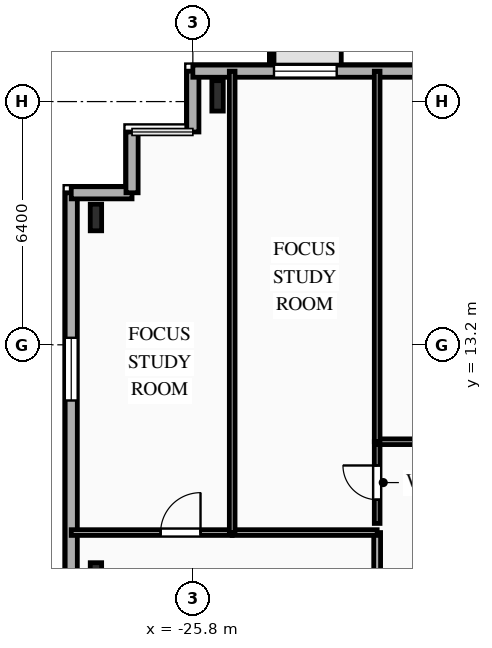
"""IFC4 building model, lengths in metres.
Left out: names, types, materials, properties, quantities, classifications, styles, units other than length and angle.
Written with IfcOpenShell. Run it as: python <this file> out.ifc"""

import sys

from ifc_helpers import new_model, si_unit, direction, frame, frame_2d, origin, origin_2d, place, context, subcontext, project, spatial, rectangle, i_section, extrude, element, fill, save


model = new_model("IFC4")
c1 = context("Model", 3, precision=1e-05, world=origin(), true_north=direction((0.0, 1.0)))
c2 = subcontext(c1, "Body", "Model", "MODEL_VIEW")
j1 = project(units=[si_unit("LENGTHUNIT", "METRE"), si_unit("PLANEANGLEUNIT", "RADIAN")], contexts=[c1])
p1 = place(None, origin())
s1 = spatial("IfcSite", under=j1, at=p1, CompositionType="ELEMENT")
p2 = place(p1, origin())
s2 = spatial("IfcBuilding", under=s1, at=p2, CompositionType="ELEMENT")
p3 = place(p2, frame((0.0, 0.0, 144.4)))
s3 = spatial("IfcBuildingStorey", under=s2, at=p3, CompositionType="ELEMENT", Elevation=144.4)
p4 = place(p3, frame((-25.15, 19.75, 0.0), z_axis=(0.0, 0.0, 1.0), x_axis=(1.0, 0.0, 0.0)))
e1 = element("IfcColumn", 1, at=p4, inside=s3, PredefinedType="COLUMN", context=c2, shape_type="SweptSolid", body=[
    extrude(i_section(OverallWidth=0.3, OverallDepth=0.8, WebThickness=0.018, FlangeThickness=0.033, FilletRadius=0.03, at=origin_2d()), origin(), (0.0, 0.0, 1.0), 3.35),
])
for number, where, z_axis, x_axis in (
    (2, (-28.35, 16.55, 0.0), (0.0, 0.0, 1.0), (1.0, 0.0, 0.0)),
    (3, (-28.35, 7.117, 0.0), (0.0, 0.0, 1.0), (1.0, 0.0, 0.0)),
):
    element("IfcColumn", number, at=place(p3, frame(where, z_axis=z_axis, x_axis=x_axis)), inside=s3, PredefinedType="COLUMN", context=c2, shape_type="SweptSolid", body=[
        extrude(i_section(OverallWidth=0.3, OverallDepth=0.7, WebThickness=0.017, FlangeThickness=0.032, FilletRadius=0.027, at=origin_2d()), origin(), (0.0, 0.0, 1.0), 3.35),
    ])
p5 = place(p3, frame((-29.0, -12.4, 0.0), z_axis=(0.0, 0.0, 1.0), x_axis=(0.0, 1.0, 0.0)))
e4 = element("IfcWall", 4, at=p5, inside=s3, PredefinedType="SOLIDWALL", context=c2, shape_type="SweptSolid", body=[
    extrude(rectangle(XDim=29.6, YDim=0.32, at=frame_2d((14.8, 0.0))), origin(), (0.0, 0.0, 1.0), 3.04),
])
p6 = place(p5, frame((3.895, 0.0, 0.85)))
e5 = element("IfcOpeningElement", 5, at=p6, cuts=e4, PredefinedType="OPENING", context=c2, shape_type="SweptSolid", body=[
    extrude(rectangle(XDim=1.65, YDim=1.85, at=frame_2d((0.825, 0.925))), frame((0.0, 0.17, 0.0), z_axis=(0.0, -1.0, 0.0), x_axis=(1.0, 0.0, 0.0)), (0.0, 0.0, 1.0), 0.34),
])
p7 = place(p5, frame((13.74, 0.0, 0.85)))
e6 = element("IfcOpeningElement", 6, at=p7, cuts=e4, PredefinedType="OPENING", context=c2, shape_type="SweptSolid", body=[
    extrude(rectangle(XDim=2.2, YDim=1.85, at=frame_2d((1.1, 0.925))), frame((0.0, 0.17, 0.0), z_axis=(0.0, -1.0, 0.0), x_axis=(1.0, 0.0, 0.0)), (0.0, 0.0, 1.0), 0.34),
])
p8 = place(p5, frame((24.135, 0.0, 0.85)))
e7 = element("IfcOpeningElement", 7, at=p8, cuts=e4, PredefinedType="OPENING", context=c2, shape_type="SweptSolid", body=[
    extrude(rectangle(XDim=1.65, YDim=1.85, at=frame_2d((0.825, 0.925))), frame((0.0, 0.17, 0.0), z_axis=(0.0, -1.0, 0.0), x_axis=(1.0, 0.0, 0.0)), (0.0, 0.0, 1.0), 0.34),
])
for number, where, z_axis, x_axis in (
    (8, (-29.0, 17.2, 0.0), (0.0, 0.0, 1.0), (1.0, 0.0, 0.0)),
    (9, (-27.4, 17.2, 0.0), (0.0, 0.0, 1.0), (0.0, 1.0, 0.0)),
):
    element("IfcWall", number, at=place(p3, frame(where, z_axis=z_axis, x_axis=x_axis)), inside=s3, PredefinedType="SOLIDWALL", context=c2, shape_type="SweptSolid", body=[
        extrude(rectangle(XDim=1.6, YDim=0.32, at=frame_2d((0.8, 0.0))), origin(), (0.0, 0.0, 1.0), 3.04),
    ])
p9 = place(p3, frame((-25.8, 18.8, 0.0), z_axis=(0.0, 0.0, 1.0), x_axis=(0.0, 1.0, 0.0)))
e10 = element("IfcWall", 10, at=p9, inside=s3, PredefinedType="SOLIDWALL", context=c2, shape_type="SweptSolid", body=[
    extrude(rectangle(XDim=1.6, YDim=0.32, at=frame_2d((0.8, 0.0))), origin(), (0.0, 0.0, 1.0), 3.04),
])
p10 = place(p3, frame((-25.8, 20.4, 0.0), z_axis=(0.0, 0.0, 1.0), x_axis=(1.0, 0.0, 0.0)))
e11 = element("IfcWall", 11, at=p10, inside=s3, PredefinedType="SOLIDWALL", context=c2, shape_type="SweptSolid", body=[
    extrude(rectangle(XDim=49.6, YDim=0.32, at=frame_2d((24.8, 0.0))), origin(), (0.0, 0.0, 1.0), 3.04),
])
p11 = place(p10, frame((2.135, 0.0, 0.85)))
e12 = element("IfcOpeningElement", 12, at=p11, cuts=e11, PredefinedType="OPENING", context=c2, shape_type="SweptSolid", body=[
    extrude(rectangle(XDim=1.65, YDim=1.85, at=frame_2d((0.825, 0.925))), frame((0.0, 0.17, 0.0), z_axis=(0.0, -1.0, 0.0), x_axis=(1.0, 0.0, 0.0)), (0.0, 0.0, 1.0), 0.34),
])
p12 = place(p10, frame((6.375, 0.0, 0.85)))
e13 = element("IfcOpeningElement", 13, at=p12, cuts=e11, PredefinedType="OPENING", context=c2, shape_type="SweptSolid", body=[
    extrude(rectangle(XDim=1.65, YDim=1.85, at=frame_2d((0.825, 0.925))), frame((0.0, 0.17, 0.0), z_axis=(0.0, -1.0, 0.0), x_axis=(1.0, 0.0, 0.0)), (0.0, 0.0, 1.0), 0.34),
])
p13 = place(p10, frame((12.53, 0.0, 0.85)))
e14 = element("IfcOpeningElement", 14, at=p13, cuts=e11, PredefinedType="OPENING", context=c2, shape_type="SweptSolid", body=[
    extrude(rectangle(XDim=1.5, YDim=1.85, at=frame_2d((0.75, 0.925))), frame((0.0, 0.17, 0.0), z_axis=(0.0, -1.0, 0.0), x_axis=(1.0, 0.0, 0.0)), (0.0, 0.0, 1.0), 0.34),
])
p14 = place(p10, frame((16.94, 0.0, 0.85)))
e15 = element("IfcOpeningElement", 15, at=p14, cuts=e11, PredefinedType="OPENING", context=c2, shape_type="SweptSolid", body=[
    extrude(rectangle(XDim=2.2, YDim=1.85, at=frame_2d((1.1, 0.925))), frame((0.0, 0.17, 0.0), z_axis=(0.0, -1.0, 0.0), x_axis=(1.0, 0.0, 0.0)), (0.0, 0.0, 1.0), 0.34),
])
p15 = place(p10, frame((21.54, 0.0, 0.85)))
e16 = element("IfcOpeningElement", 16, at=p15, cuts=e11, PredefinedType="OPENING", context=c2, shape_type="SweptSolid", body=[
    extrude(rectangle(XDim=2.2, YDim=1.85, at=frame_2d((1.1, 0.925))), frame((0.0, 0.17, 0.0), z_axis=(0.0, -1.0, 0.0), x_axis=(1.0, 0.0, 0.0)), (0.0, 0.0, 1.0), 0.34),
])
p16 = place(p10, frame((26.78, 0.0, 0.85)))
e17 = element("IfcOpeningElement", 17, at=p16, cuts=e11, PredefinedType="OPENING", context=c2, shape_type="SweptSolid", body=[
    extrude(rectangle(XDim=2.2, YDim=1.85, at=frame_2d((1.1, 0.925))), frame((0.0, 0.17, 0.0), z_axis=(0.0, -1.0, 0.0), x_axis=(1.0, 0.0, 0.0)), (0.0, 0.0, 1.0), 0.34),
])
p17 = place(p10, frame((33.132, 0.0, 0.85)))
e18 = element("IfcOpeningElement", 18, at=p17, cuts=e11, PredefinedType="OPENING", context=c2, shape_type="SweptSolid", body=[
    extrude(rectangle(XDim=2.2, YDim=1.85, at=frame_2d((1.1, 0.925))), frame((0.0, 0.17, 0.0), z_axis=(0.0, -1.0, 0.0), x_axis=(1.0, 0.0, 0.0)), (0.0, 0.0, 1.0), 0.34),
])
p18 = place(p10, frame((37.22, 0.0, 0.85)))
e19 = element("IfcOpeningElement", 19, at=p18, cuts=e11, PredefinedType="OPENING", context=c2, shape_type="SweptSolid", body=[
    extrude(rectangle(XDim=2.2, YDim=1.85, at=frame_2d((1.1, 0.925))), frame((0.0, 0.17, 0.0), z_axis=(0.0, -1.0, 0.0), x_axis=(1.0, 0.0, 0.0)), (0.0, 0.0, 1.0), 0.34),
])
p19 = place(p10, frame((43.055, 0.0, 0.85)))
e20 = element("IfcOpeningElement", 20, at=p19, cuts=e11, PredefinedType="OPENING", context=c2, shape_type="SweptSolid", body=[
    extrude(rectangle(XDim=1.65, YDim=1.85, at=frame_2d((0.825, 0.925))), frame((0.0, 0.17, 0.0), z_axis=(0.0, -1.0, 0.0), x_axis=(1.0, 0.0, 0.0)), (0.0, 0.0, 1.0), 0.34),
])
p20 = place(p10, frame((47.45, 0.0, 0.85)))
e21 = element("IfcOpeningElement", 21, at=p20, cuts=e11, PredefinedType="OPENING", context=c2, shape_type="SweptSolid", body=[
    extrude(rectangle(XDim=1.1, YDim=1.85, at=frame_2d((0.55, 0.925))), frame((0.0, 0.17, 0.0), z_axis=(0.0, -1.0, 0.0), x_axis=(1.0, 0.0, 0.0)), (0.0, 0.0, 1.0), 0.34),
])
p21 = place(p3, frame((-20.95, 8.5, 0.0), z_axis=(0.0, 0.0, 1.0), x_axis=(0.0, 1.0, 0.0)))
e22 = element("IfcWall", 22, at=p21, inside=s3, PredefinedType="PARTITIONING", context=c2, shape_type="SweptSolid", body=[
    extrude(rectangle(XDim=2.15, YDim=0.15, at=frame_2d((1.075, 0.0))), origin(), (0.0, 0.0, 1.0), 3.04),
])
p22 = place(p21, frame((0.625, 0.0, 0.0)))
e23 = element("IfcOpeningElement", 23, at=p22, cuts=e22, PredefinedType="OPENING", context=c2, shape_type="SweptSolid", body=[
    extrude(rectangle(XDim=0.9, YDim=2.1, at=frame_2d((0.45, 1.05))), frame((0.0, 0.085, 0.0), z_axis=(0.0, -1.0, 0.0), x_axis=(1.0, 0.0, 0.0)), (0.0, 0.0, 1.0), 0.17),
])
p23 = place(p3, frame((-20.95, 10.65, 0.0), z_axis=(0.0, 0.0, 1.0), x_axis=(1.0, 0.0, 0.0)))
e24 = element("IfcWall", 24, at=p23, inside=s3, PredefinedType="PARTITIONING", context=c2, shape_type="SweptSolid", body=[
    extrude(rectangle(XDim=4.638, YDim=0.15, at=frame_2d((2.319, 0.0))), origin(), (0.0, 0.0, 1.0), 3.04),
])
p24 = place(p23, frame((2.705, 0.0, 0.0)))
e25 = element("IfcOpeningElement", 25, at=p24, cuts=e24, PredefinedType="OPENING", context=c2, shape_type="SweptSolid", body=[
    extrude(rectangle(XDim=1.05, YDim=2.15, at=frame_2d((0.525, 1.075))), frame((0.0, 0.085, 0.0), z_axis=(0.0, -1.0, 0.0), x_axis=(1.0, 0.0, 0.0)), (0.0, 0.0, 1.0), 0.17),
])
p25 = place(p3, frame((-20.95, -1.31, 0.0), z_axis=(0.0, 0.0, 1.0), x_axis=(0.0, 1.0, 0.0)))
e26 = element("IfcWall", 26, at=p25, inside=s3, PredefinedType="PARTITIONING", context=c2, shape_type="SweptSolid", body=[
    extrude(rectangle(XDim=9.57, YDim=0.18, at=frame_2d((4.785, 0.0))), origin(), (0.0, 0.0, 1.0), 3.04),
])
p26 = place(p25, frame((1.506, 0.0, 0.0)))
e27 = element("IfcOpeningElement", 27, at=p26, cuts=e26, PredefinedType="OPENING", context=c2, shape_type="SweptSolid", body=[
    extrude(rectangle(XDim=1.0, YDim=2.15, at=frame_2d((0.5, 1.075))), frame((0.0, 0.1, 0.0), z_axis=(0.0, -1.0, 0.0), x_axis=(1.0, 0.0, 0.0)), (0.0, 0.0, 1.0), 0.2),
])
p27 = place(p3, frame((-29.0, 8.26, 0.0), z_axis=(0.0, 0.0, 1.0), x_axis=(1.0, 0.0, 0.0)))
e28 = element("IfcWall", 28, at=p27, inside=s3, PredefinedType="PARTITIONING", context=c2, shape_type="SweptSolid", body=[
    extrude(rectangle(XDim=4.235, YDim=0.15, at=frame_2d((2.118, 0.0))), origin(), (0.0, 0.0, 1.0), 3.04),
])
p28 = place(p27, frame((2.352, 0.0, 0.0)))
e29 = element("IfcOpeningElement", 29, at=p28, cuts=e28, PredefinedType="OPENING", context=c2, shape_type="SweptSolid", body=[
    extrude(rectangle(XDim=1.05, YDim=2.15, at=frame_2d((0.525, 1.075))), frame((0.0, 0.085, 0.0), z_axis=(0.0, -1.0, 0.0), x_axis=(1.0, 0.0, 0.0)), (0.0, 0.0, 1.0), 0.17),
])
p29 = place(p3, frame((-24.765, 8.26, 0.0), z_axis=(0.0, 0.0, 1.0), x_axis=(1.0, 0.0, 0.0)))
e30 = element("IfcWall", 30, at=p29, inside=s3, PredefinedType="PARTITIONING", context=c2, shape_type="SweptSolid", body=[
    extrude(rectangle(XDim=3.815, YDim=0.15, at=frame_2d((1.907, 0.0))), origin(), (0.0, 0.0, 1.0), 3.04),
])
p30 = place(p3, frame((-24.765, 20.4, 0.0), z_axis=(0.0, 0.0, 1.0), x_axis=(0.0, -1.0, 0.0)))
e31 = element("IfcWall", 31, at=p30, inside=s3, PredefinedType="PARTITIONING", context=c2, shape_type="SweptSolid", body=[
    extrude(rectangle(XDim=12.14, YDim=0.15, at=frame_2d((6.07, 0.0))), origin(), (0.0, 0.0, 1.0), 3.04),
])
p31 = place(p3, frame((-20.95, 20.4, 0.0), z_axis=(0.0, 0.0, 1.0), x_axis=(0.0, -1.0, 0.0)))
e32 = element("IfcWall", 32, at=p31, inside=s3, PredefinedType="PARTITIONING", context=c2, shape_type="SweptSolid", body=[
    extrude(rectangle(XDim=9.75, YDim=0.15, at=frame_2d((4.875, 0.0))), origin(), (0.0, 0.0, 1.0), 3.04),
])
p32 = place(p8, origin())
e33 = element("IfcWindow", 33, at=p32, inside=s3, PartitioningType="SINGLE_PANEL", PredefinedType="WINDOW", context=c2, shape_type="SweptSolid", body=[
    extrude(rectangle(XDim=1.65, YDim=1.85, at=frame_2d((0.825, 0.925))), frame((0.0, 0.03, 0.0), z_axis=(0.0, -1.0, 0.0), x_axis=(1.0, 0.0, 0.0)), (0.0, 0.0, 1.0), 0.06),
])
fill(e7, e33)
p33 = place(p11, origin())
e34 = element("IfcWindow", 34, at=p33, inside=s3, PartitioningType="SINGLE_PANEL", PredefinedType="WINDOW", context=c2, shape_type="SweptSolid", body=[
    extrude(rectangle(XDim=1.65, YDim=1.85, at=frame_2d((0.825, 0.925))), frame((0.0, 0.03, 0.0), z_axis=(0.0, -1.0, 0.0), x_axis=(1.0, 0.0, 0.0)), (0.0, 0.0, 1.0), 0.06),
])
fill(e12, e34)
p34 = place(p22, origin())
e35 = element("IfcDoor", 35, at=p34, inside=s3, OperationType="SINGLE_SWING_RIGHT", PredefinedType="DOOR", context=c2, shape_type="SweptSolid", body=[
    extrude(rectangle(XDim=0.9, YDim=2.1, at=frame_2d((0.45, 1.05))), frame((0.0, 0.025, 0.0), z_axis=(0.0, -1.0, 0.0), x_axis=(1.0, 0.0, 0.0)), (0.0, 0.0, 1.0), 0.05),
])
fill(e23, e35)
p35 = place(p28, origin())
e36 = element("IfcDoor", 36, at=p35, inside=s3, OperationType="SINGLE_SWING_RIGHT", PredefinedType="DOOR", context=c2, shape_type="SweptSolid", body=[
    extrude(rectangle(XDim=1.05, YDim=2.15, at=frame_2d((0.525, 1.075))), frame((0.0, 0.025, 0.0), z_axis=(0.0, -1.0, 0.0), x_axis=(1.0, 0.0, 0.0)), (0.0, 0.0, 1.0), 0.05),
])
fill(e29, e36)
save(model, sys.argv[1])
